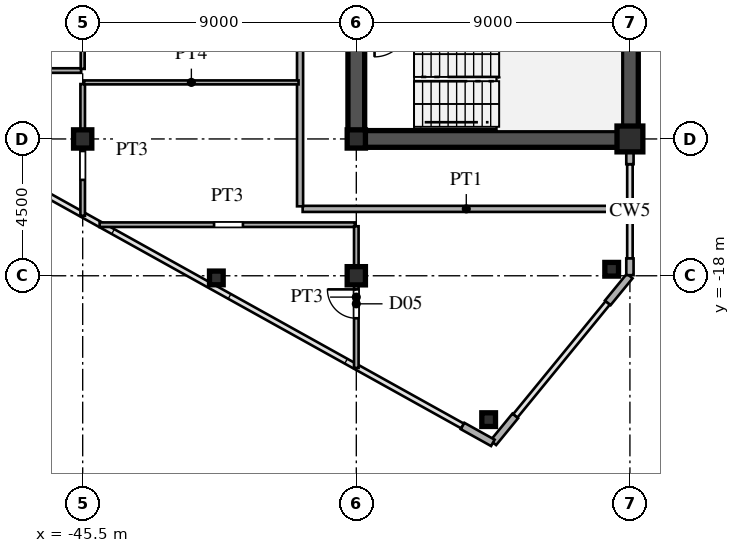
"""IFC4 building model, lengths in metres.
Left out: names, types, materials, properties, quantities, classifications, styles, units other than length and angle.
Written with IfcOpenShell. Run it as: python <this file> out.ifc"""

import sys

from ifc_helpers import new_model, si_unit, direction, frame, frame_2d, origin, origin_2d, place, context, subcontext, project, spatial, rectangle, hollow_rectangle, i_section, extrude, source, transform, mapped, element, fill, save


model = new_model("IFC4")
c1 = context("Model", 3, precision=1e-05, world=origin(), true_north=direction((0.0, 1.0)))
c2 = subcontext(c1, "Body", "Model", "MODEL_VIEW")
j1 = project(units=[si_unit("LENGTHUNIT", "METRE"), si_unit("PLANEANGLEUNIT", "RADIAN")], contexts=[c1])
p1 = place(None, origin())
s1 = spatial("IfcSite", under=j1, at=p1, CompositionType="ELEMENT")
p2 = place(p1, origin())
s2 = spatial("IfcBuilding", under=s1, at=p2, CompositionType="ELEMENT")
p3 = place(p2, frame((0.0, 0.0, 181.5)))
s3 = spatial("IfcBuildingStorey", under=s2, at=p3, CompositionType="ELEMENT", Elevation=181.5)
m1 = source(origin(), c2, "Body", "SweptSolid", [
    extrude(hollow_rectangle(XDim=0.85, YDim=0.85, WallThickness=0.036, at=origin_2d()), origin(), (0.0, 0.0, 1.0), 3.6),
])
p4 = place(p3, frame((-27.5, -13.5, 0.0), z_axis=(0.0, 0.0, 1.0), x_axis=(1.0, 0.0, 0.0)))
e1 = element("IfcColumn", 1, at=p4, inside=s3, PredefinedType="COLUMN", context=c2, shape_type="MappedRepresentation", body=[
    mapped(m1, transform((0.0, 0.0, 0.0), scale=1.0)),
])
m2 = source(origin(), c2, "Body", "SweptSolid", [
    extrude(i_section(OverallWidth=0.6, OverallDepth=0.6, WebThickness=0.025, FlangeThickness=0.04, at=origin_2d()), origin(), (0.0, 0.0, 1.0), 3.6),
])
for number, where, z_axis, x_axis in (
    (2, (-36.5, -18.0, 0.0), (0.0, 0.0, 1.0), (1.0, 0.0, 0.0)),
    (3, (-36.5, -13.5, 0.0), (0.0, 0.0, 1.0), (1.0, 0.0, 0.0)),
    (4, (-45.5, -13.5, 0.0), (0.0, 0.0, 1.0), (1.0, 0.0, 0.0)),
):
    element("IfcColumn", number, at=place(p3, frame(where, z_axis=z_axis, x_axis=x_axis)), inside=s3, PredefinedType="COLUMN", context=c2, shape_type="MappedRepresentation", body=[
        mapped(m2, transform((0.0, 0.0, 0.0), scale=1.0)),
    ])
m3 = source(origin(), c2, "Body", "SweptSolid", [
    extrude(hollow_rectangle(XDim=0.45, YDim=0.45, WallThickness=0.018, at=origin_2d()), origin(), (0.0, 0.0, 1.0), 3.6),
])
for number, where, z_axis, x_axis in (
    (5, (-28.1, -17.786, 0.0), (0.0, 0.0, 1.0), (1.0, 0.0, 0.0)),
    (6, (-32.147, -22.732, 0.0), (0.0, 0.0, 1.0), (1.0, 0.0, 0.0)),
    (7, (-41.104, -18.071, 0.0), (0.0, 0.0, 1.0), (1.0, 0.0, 0.0)),
):
    element("IfcColumn", number, at=place(p3, frame(where, z_axis=z_axis, x_axis=x_axis)), inside=s3, PredefinedType="COLUMN", context=c2, shape_type="MappedRepresentation", body=[
        mapped(m3, transform((0.0, 0.0, 0.0), scale=1.0)),
    ])
p5 = place(p3, frame((-27.5, -17.98, 0.0), z_axis=(0.0, 0.0, 1.0), x_axis=(0.0, 1.0, 0.0)))
e8 = element("IfcWall", 8, at=p5, inside=s3, PredefinedType="SOLIDWALL", context=c2, shape_type="SweptSolid", body=[
    extrude(rectangle(XDim=0.55, YDim=0.24, at=frame_2d((0.275, 0.0))), origin(), (0.0, 0.0, 1.0), 3.38),
])
p6 = place(p3, frame((-27.5, -14.33, 0.0), z_axis=(0.0, 0.0, 1.0), x_axis=(0.0, 1.0, 0.0)))
e9 = element("IfcWall", 9, at=p6, inside=s3, PredefinedType="SOLIDWALL", context=c2, shape_type="SweptSolid", body=[
    extrude(rectangle(XDim=0.55, YDim=0.24, at=frame_2d((0.275, 0.0))), origin(), (0.0, 0.0, 1.0), 2.88),
])
p7 = place(p3, frame((-33.005, -22.941, 0.0), z_axis=(0.0, 0.0, 1.0), x_axis=(0.87385402111, -0.486188389196, 0.0)))
e10 = element("IfcWall", 10, at=p7, inside=s3, PredefinedType="SOLIDWALL", context=c2, shape_type="SweptSolid", body=[
    extrude(rectangle(XDim=1.14, YDim=0.24, at=frame_2d((0.57, 0.0))), origin(), (0.0, 0.0, 1.0), 3.38),
])
for number, where, z_axis, x_axis in (
    (11, (-31.994, -23.492, 0.0), (0.0, 0.0, 1.0), (0.633, 0.774, 0.0)),
    (12, (-28.228, -18.89, 0.0), (0.0, 0.0, 1.0), (0.633, 0.774, 0.0)),
):
    element("IfcWall", number, at=place(p3, frame(where, z_axis=z_axis, x_axis=x_axis)), inside=s3, PredefinedType="SOLIDWALL", context=c2, shape_type="SweptSolid", body=[
        extrude(rectangle(XDim=1.14, YDim=0.24, at=frame_2d((0.57, 0.0))), origin(), (0.0, 0.0, 1.0), 3.38),
    ])
p8 = place(p3, frame((-27.5, -13.5, 0.0), z_axis=(0.0, 0.0, 1.0), x_axis=(0.0, 1.0, 0.0)))
e13 = element("IfcWall", 13, at=p8, inside=s3, PredefinedType="SHEAR", context=c2, shape_type="SweptSolid", body=[
    extrude(rectangle(XDim=12.2, YDim=0.55, at=frame_2d((6.1, 0.0))), origin(), (0.0, 0.0, 1.0), 3.38),
])
p9 = place(p3, frame((-36.5, -13.5, 0.0), z_axis=(0.0, 0.0, 1.0), x_axis=(1.0, 0.0, 0.0)))
e14 = element("IfcWall", 14, at=p9, inside=s3, PredefinedType="SHEAR", context=c2, shape_type="SweptSolid", body=[
    extrude(rectangle(XDim=9.0, YDim=0.55, at=frame_2d((4.5, 0.0))), origin(), (0.0, 0.0, 1.0), 3.38),
])
p10 = place(p3, frame((-36.5, -13.65, 0.0), z_axis=(0.0, 0.0, 1.0), x_axis=(0.0, 1.0, 0.0)))
e15 = element("IfcWall", 15, at=p10, inside=s3, PredefinedType="SHEAR", context=c2, shape_type="SweptSolid", body=[
    extrude(rectangle(XDim=7.15, YDim=0.55, at=frame_2d((3.575, 0.0))), origin(), (0.0, 0.0, 1.0), 3.38),
])
p11 = place(p10, frame((4.675, 0.0, 0.0)))
e16 = element("IfcOpeningElement", 16, at=p11, cuts=e15, PredefinedType="OPENING", context=c2, shape_type="SweptSolid", body=[
    extrude(rectangle(XDim=1.15, YDim=2.2, at=frame_2d((0.575, 1.1))), frame((0.0, 0.285, 0.0), z_axis=(0.0, -1.0, 0.0), x_axis=(1.0, 0.0, 0.0)), (0.0, 0.0, 1.0), 0.57),
])
p12 = place(p3, frame((-44.943, -16.32, 0.0), z_axis=(0.0, 0.0, 1.0), x_axis=(1.0, 0.0, 0.0)))
e17 = element("IfcWall", 17, at=p12, inside=s3, PredefinedType="PARTITIONING", context=c2, shape_type="SweptSolid", body=[
    extrude(rectangle(XDim=8.393, YDim=0.15, at=frame_2d((4.197, 0.0))), origin(), (0.0, 0.0, 1.0), 3.38),
])
p13 = place(p12, frame((3.764, 0.0, 0.0)))
e18 = element("IfcOpeningElement", 18, at=p13, cuts=e17, PredefinedType="OPENING", context=c2, shape_type="SweptSolid", body=[
    extrude(rectangle(XDim=0.95, YDim=2.15, at=frame_2d((0.475, 1.075))), frame((0.0, 0.085, 0.0), z_axis=(0.0, -1.0, 0.0), x_axis=(1.0, 0.0, 0.0)), (0.0, 0.0, 1.0), 0.17),
])
p14 = place(p3, frame((-38.265, -15.8, 0.0), z_axis=(0.0, 0.0, 1.0), x_axis=(1.0, 0.0, 0.0)))
e19 = element("IfcWall", 19, at=p14, inside=s3, PredefinedType="PARTITIONING", context=c2, shape_type="SweptSolid", body=[
    extrude(rectangle(XDim=10.765, YDim=0.2, at=frame_2d((5.382, 0.0))), origin(), (0.0, 0.0, 1.0), 3.38),
])
p15 = place(p3, frame((-45.45, -11.64, 0.0), z_axis=(0.0, 0.0, 1.0), x_axis=(1.0, 0.0, 0.0)))
e20 = element("IfcWall", 20, at=p15, inside=s3, PredefinedType="PARTITIONING", context=c2, shape_type="SweptSolid", body=[
    extrude(rectangle(XDim=7.05, YDim=0.13, at=frame_2d((3.525, 0.0))), origin(), (0.0, 0.0, 1.0), 3.38),
])
p16 = place(p3, frame((-53.983, -11.25, 0.0), z_axis=(0.0, 0.0, 1.0), x_axis=(1.0, 0.0, 0.0)))
e21 = element("IfcWall", 21, at=p16, inside=s3, PredefinedType="PARTITIONING", context=c2, shape_type="SweptSolid", body=[
    extrude(rectangle(XDim=8.433, YDim=0.15, at=frame_2d((4.216, 0.0))), origin(), (0.0, 0.0, 1.0), 3.38),
])
p17 = place(p16, frame((3.741, 0.0, 0.0)))
e22 = element("IfcOpeningElement", 22, at=p17, cuts=e21, PredefinedType="OPENING", context=c2, shape_type="SweptSolid", body=[
    extrude(rectangle(XDim=0.95, YDim=2.15, at=frame_2d((0.475, 1.075))), frame((0.0, 0.085, 0.0), z_axis=(0.0, -1.0, 0.0), x_axis=(1.0, 0.0, 0.0)), (0.0, 0.0, 1.0), 0.17),
])
p18 = place(p3, frame((-45.5, -16.027, 0.0), z_axis=(0.0, 0.0, 1.0), x_axis=(0.0, 1.0, 0.0)))
e23 = element("IfcWall", 23, at=p18, inside=s3, PredefinedType="PARTITIONING", context=c2, shape_type="SweptSolid", body=[
    extrude(rectangle(XDim=4.332, YDim=0.15, at=frame_2d((2.166, 0.0))), origin(), (0.0, 0.0, 1.0), 2.78),
])
p19 = place(p18, frame((1.181, 0.0, 0.0)))
e24 = element("IfcOpeningElement", 24, at=p19, cuts=e23, PredefinedType="OPENING", context=c2, shape_type="SweptSolid", body=[
    extrude(rectangle(XDim=0.95, YDim=2.15, at=frame_2d((0.475, 1.075))), frame((0.0, 0.085, 0.0), z_axis=(0.0, -1.0, 0.0), x_axis=(1.0, 0.0, 0.0)), (0.0, 0.0, 1.0), 0.17),
])
p20 = place(p3, frame((-45.5, -11.196, 0.0), z_axis=(0.0, 0.0, 1.0), x_axis=(0.0, 1.0, 0.0)))
e25 = element("IfcWall", 25, at=p20, inside=s3, PredefinedType="PARTITIONING", context=c2, shape_type="SweptSolid", body=[
    extrude(rectangle(XDim=13.979, YDim=0.13, at=frame_2d((6.99, 0.0))), origin(), (0.0, 0.0, 1.0), 2.78),
])
p21 = place(p20, frame((2.823, 0.0, 0.0)))
e26 = element("IfcOpeningElement", 26, at=p21, cuts=e25, PredefinedType="OPENING", context=c2, shape_type="SweptSolid", body=[
    extrude(rectangle(XDim=0.95, YDim=2.15, at=frame_2d((0.475, 1.075))), frame((0.0, 0.075, 0.0), z_axis=(0.0, -1.0, 0.0), x_axis=(1.0, 0.0, 0.0)), (0.0, 0.0, 1.0), 0.15),
])
p22 = place(p20, frame((11.221, 0.0, 0.0)))
e27 = element("IfcOpeningElement", 27, at=p22, cuts=e25, PredefinedType="OPENING", context=c2, shape_type="SweptSolid", body=[
    extrude(rectangle(XDim=0.95, YDim=2.15, at=frame_2d((0.475, 1.075))), frame((0.0, 0.075, 0.0), z_axis=(0.0, -1.0, 0.0), x_axis=(1.0, 0.0, 0.0)), (0.0, 0.0, 1.0), 0.15),
])
p23 = place(p3, frame((-38.35, -15.715, 0.0), z_axis=(0.0, 0.0, 1.0), x_axis=(0.0, 1.0, 0.0)))
e28 = element("IfcWall", 28, at=p23, inside=s3, PredefinedType="PARTITIONING", context=c2, shape_type="SweptSolid", body=[
    extrude(rectangle(XDim=31.43, YDim=0.2, at=frame_2d((15.715, 0.0))), origin(), (0.0, 0.0, 1.0), 3.38),
])
p24 = place(p23, frame((7.292, 0.0, 0.0)))
e29 = element("IfcOpeningElement", 29, at=p24, cuts=e28, PredefinedType="OPENING", context=c2, shape_type="SweptSolid", body=[
    extrude(rectangle(XDim=1.05, YDim=2.25, at=frame_2d((0.525, 1.125))), frame((0.0, 0.11, 0.0), z_axis=(0.0, -1.0, 0.0), x_axis=(1.0, 0.0, 0.0)), (0.0, 0.0, 1.0), 0.22),
])
p25 = place(p23, frame((15.48, 0.0, 0.0)))
e30 = element("IfcOpeningElement", 30, at=p25, cuts=e28, PredefinedType="OPENING", context=c2, shape_type="SweptSolid", body=[
    extrude(rectangle(XDim=1.05, YDim=2.25, at=frame_2d((0.525, 1.125))), frame((0.0, 0.11, 0.0), z_axis=(0.0, -1.0, 0.0), x_axis=(1.0, 0.0, 0.0)), (0.0, 0.0, 1.0), 0.22),
])
p26 = place(p23, frame((26.84, 0.0, 0.0)))
e31 = element("IfcOpeningElement", 31, at=p26, cuts=e28, PredefinedType="OPENING", context=c2, shape_type="SweptSolid", body=[
    extrude(rectangle(XDim=1.05, YDim=2.25, at=frame_2d((0.525, 1.125))), frame((0.0, 0.11, 0.0), z_axis=(0.0, -1.0, 0.0), x_axis=(1.0, 0.0, 0.0)), (0.0, 0.0, 1.0), 0.22),
])
p27 = place(p3, frame((-36.5, -21.032, 0.0), z_axis=(0.0, 0.0, 1.0), x_axis=(0.0, 1.0, 0.0)))
e32 = element("IfcWall", 32, at=p27, inside=s3, PredefinedType="PARTITIONING", context=c2, shape_type="SweptSolid", body=[
    extrude(rectangle(XDim=4.661, YDim=0.15, at=frame_2d((2.331, 0.0))), origin(), (0.0, 0.0, 1.0), 2.78),
])
p28 = place(p27, frame((1.634, 0.0, 0.0)))
e33 = element("IfcOpeningElement", 33, at=p28, cuts=e32, PredefinedType="OPENING", context=c2, shape_type="SweptSolid", body=[
    extrude(rectangle(XDim=0.95, YDim=2.15, at=frame_2d((0.475, 1.075))), frame((0.0, 0.085, 0.0), z_axis=(0.0, -1.0, 0.0), x_axis=(1.0, 0.0, 0.0)), (0.0, 0.0, 1.0), 0.17),
])
m4 = source(origin(), c2, "Body", "SweptSolid", [
    extrude(rectangle(XDim=0.95, YDim=2.15, at=frame_2d((0.475, 1.075))), frame((0.0, 0.025, 0.0), z_axis=(0.0, -1.0, 0.0), x_axis=(1.0, 0.0, 0.0)), (0.0, 0.0, 1.0), 0.05),
])
p29 = place(p28, origin())
e34 = element("IfcDoor", 34, at=p29, inside=s3, OperationType="SINGLE_SWING_RIGHT", PredefinedType="DOOR", context=c2, shape_type="MappedRepresentation", body=[
    mapped(m4, transform((0.0, 0.0, 0.0), scale=1.0)),
])
fill(e33, e34)
save(model, sys.argv[1])
